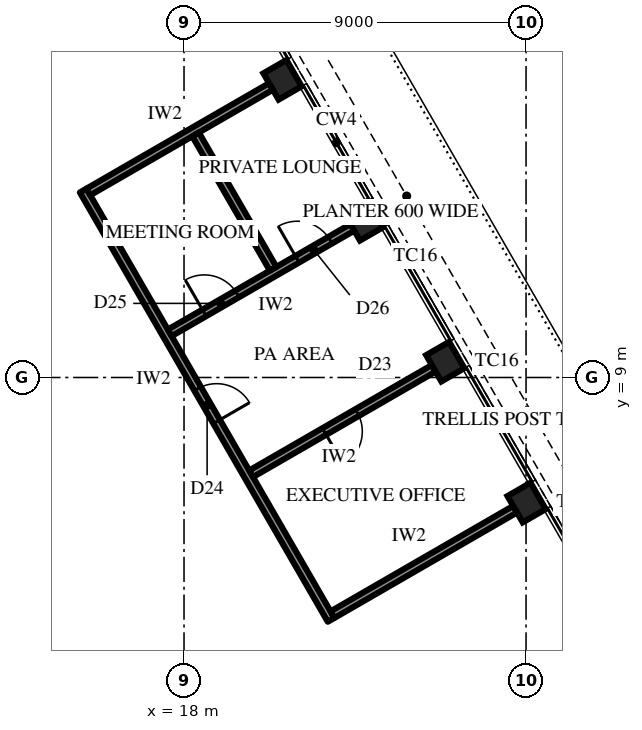
"""IFC4 building model, lengths in metres.
Left out: names, types, materials, properties, quantities, classifications, styles, units other than length and angle.
Written with IfcOpenShell. Run it as: python <this file> out.ifc"""

import sys

from ifc_helpers import new_model, si_unit, direction, frame, frame_2d, origin, origin_2d, place, context, subcontext, project, spatial, rectangle, extrude, element, fill, save


model = new_model("IFC4")
c1 = context("Model", 3, precision=1e-05, world=origin(), true_north=direction((0.0, 1.0)))
c2 = subcontext(c1, "Body", "Model", "MODEL_VIEW")
j1 = project(units=[si_unit("LENGTHUNIT", "METRE"), si_unit("PLANEANGLEUNIT", "RADIAN")], contexts=[c1])
p1 = place(None, origin())
s1 = spatial("IfcSite", under=j1, at=p1, CompositionType="ELEMENT")
p2 = place(p1, origin())
s2 = spatial("IfcBuilding", under=s1, at=p2, CompositionType="ELEMENT")
p3 = place(p2, frame((0.0, 0.0, 374.5)))
s3 = spatial("IfcBuildingStorey", under=s2, at=p3, CompositionType="ELEMENT", Elevation=374.5)
for number, where, z_axis, x_axis in (
    (1, (27.015, 5.708, 0.0), (0.0, 0.0, 1.0), (-0.5, 0.866, 0.0)),
    (2, (24.874, 9.417, 0.0), (0.0, 0.0, 1.0), (-0.5, 0.866, 0.0)),
    (3, (22.733, 13.125, 0.0), (0.0, 0.0, 1.0), (-0.5, 0.866, 0.0)),
    (4, (20.592, 16.833, 0.0), (0.0, 0.0, 1.0), (-0.5, 0.866, 0.0)),
):
    element("IfcColumn", number, at=place(p3, frame(where, z_axis=z_axis, x_axis=x_axis)), inside=s3, PredefinedType="COLUMN", context=c2, shape_type="SweptSolid", body=[
        extrude(rectangle(XDim=0.8, YDim=0.7, at=origin_2d()), origin(), (0.0, 0.0, 1.0), 4.2),
    ])
p4 = place(p3, frame((21.869, 2.622, 0.0), z_axis=(0.0, 0.0, 1.0), x_axis=(-0.500013496215, 0.866017611601, 0.0)))
e5 = element("IfcWall", 5, at=p4, inside=s3, PredefinedType="PARTITIONING", context=c2, shape_type="SweptSolid", body=[
    extrude(rectangle(XDim=13.046, YDim=0.2, at=frame_2d((6.523, 0.0))), origin(), (0.0, 0.0, 1.0), 4.0),
])
p5 = place(p4, frame((6.023, 0.0, 0.0)))
e6 = element("IfcOpeningElement", 6, at=p5, cuts=e5, PredefinedType="OPENING", context=c2, shape_type="SweptSolid", body=[
    extrude(rectangle(XDim=1.0, YDim=2.2, at=frame_2d((0.5, 1.1))), frame((0.0, 0.11, 0.0), z_axis=(0.0, -1.0, 0.0), x_axis=(1.0, 0.0, 0.0)), (0.0, 0.0, 1.0), 0.22),
])
p6 = place(p3, frame((21.906, 2.758, 0.0), z_axis=(0.0, 0.0, 1.0), x_axis=(0.866022967649, 0.500004219487, 0.0)))
e7 = element("IfcWall", 7, at=p6, inside=s3, PredefinedType="PARTITIONING", context=c2, shape_type="SweptSolid", body=[
    extrude(rectangle(XDim=5.55, YDim=0.2, at=frame_2d((2.775, 0.0))), origin(), (0.0, 0.0, 1.0), 3.082),
])
p7 = place(p3, frame((19.765, 6.467, 0.0), z_axis=(0.0, 0.0, 1.0), x_axis=(0.866011969997, 0.500023267281, 0.0)))
e8 = element("IfcWall", 8, at=p7, inside=s3, PredefinedType="PARTITIONING", context=c2, shape_type="SweptSolid", body=[
    extrude(rectangle(XDim=5.55, YDim=0.2, at=frame_2d((2.775, 0.0))), origin(), (0.0, 0.0, 1.0), 2.992),
])
p8 = place(p7, frame((2.225, 0.0, 0.0)))
e9 = element("IfcOpeningElement", 9, at=p8, cuts=e8, PredefinedType="OPENING", context=c2, shape_type="SweptSolid", body=[
    extrude(rectangle(XDim=1.0, YDim=2.2, at=frame_2d((0.5, 1.1))), frame((0.0, 0.11, 0.0), z_axis=(0.0, -1.0, 0.0), x_axis=(1.0, 0.0, 0.0)), (0.0, 0.0, 1.0), 0.22),
])
p9 = place(p3, frame((17.624, 10.175, 0.0), z_axis=(0.0, 0.0, 1.0), x_axis=(0.866042014628, 0.499971228071, 0.0)))
e10 = element("IfcWall", 10, at=p9, inside=s3, PredefinedType="PARTITIONING", context=c2, shape_type="SweptSolid", body=[
    extrude(rectangle(XDim=5.55, YDim=0.2, at=frame_2d((2.775, 0.0))), origin(), (0.0, 0.0, 1.0), 3.082),
])
p10 = place(p9, frame((1.05, 0.0, 0.0)))
e11 = element("IfcOpeningElement", 11, at=p10, cuts=e10, PredefinedType="OPENING", context=c2, shape_type="SweptSolid", body=[
    extrude(rectangle(XDim=1.0, YDim=2.2, at=frame_2d((0.5, 1.1))), frame((0.0, 0.11, 0.0), z_axis=(0.0, -1.0, 0.0), x_axis=(1.0, 0.0, 0.0)), (0.0, 0.0, 1.0), 0.22),
])
p11 = place(p9, frame((3.875, 0.0, 0.0)))
e12 = element("IfcOpeningElement", 12, at=p11, cuts=e10, PredefinedType="OPENING", context=c2, shape_type="SweptSolid", body=[
    extrude(rectangle(XDim=1.0, YDim=2.2, at=frame_2d((0.5, 1.1))), frame((0.0, 0.11, 0.0), z_axis=(0.0, -1.0, 0.0), x_axis=(1.0, 0.0, 0.0)), (0.0, 0.0, 1.0), 0.22),
])
p12 = place(p3, frame((15.483, 13.883, 0.0), z_axis=(0.0, 0.0, 1.0), x_axis=(0.866011969997, 0.500023267281, 0.0)))
e13 = element("IfcWall", 13, at=p12, inside=s3, PredefinedType="PARTITIONING", context=c2, shape_type="SweptSolid", body=[
    extrude(rectangle(XDim=5.55, YDim=0.2, at=frame_2d((2.775, 0.0))), origin(), (0.0, 0.0, 1.0), 3.082),
])
p13 = place(p3, frame((20.345, 11.862, 0.0), z_axis=(0.0, 0.0, 1.0), x_axis=(-0.499998569178, 0.866026229868, 0.0)))
e14 = element("IfcWall", 14, at=p13, inside=s3, PredefinedType="PARTITIONING", context=c2, shape_type="SweptSolid", body=[
    extrude(rectangle(XDim=4.082, YDim=0.2, at=frame_2d((2.041, 0.0))), origin(), (0.0, 0.0, 1.0), 4.0),
])
p14 = place(p8, frame((1.0, 0.0, 0.0), z_axis=(0.0, 0.0, 1.0), x_axis=(-1.0, 0.0, 0.0)))
e15 = element("IfcDoor", 15, at=p14, inside=s3, OperationType="SINGLE_SWING_LEFT", PredefinedType="DOOR", context=c2, shape_type="SweptSolid", body=[
    extrude(rectangle(XDim=1.0, YDim=2.2, at=frame_2d((0.5, 1.1))), frame((0.0, 0.025, 0.0), z_axis=(0.0, -1.0, 0.0), x_axis=(1.0, 0.0, 0.0)), (0.0, 0.0, 1.0), 0.05),
])
fill(e9, e15)
p15 = place(p5, frame((1.0, 0.0, 0.0), z_axis=(0.0, 0.0, 1.0), x_axis=(-1.0, 0.0, 0.0)))
e16 = element("IfcDoor", 16, at=p15, inside=s3, OperationType="SINGLE_SWING_LEFT", PredefinedType="DOOR", context=c2, shape_type="SweptSolid", body=[
    extrude(rectangle(XDim=1.0, YDim=2.2, at=frame_2d((0.5, 1.1))), frame((0.0, 0.025, 0.0), z_axis=(0.0, -1.0, 0.0), x_axis=(1.0, 0.0, 0.0)), (0.0, 0.0, 1.0), 0.05),
])
fill(e6, e16)
p16 = place(p10, origin())
e17 = element("IfcDoor", 17, at=p16, inside=s3, OperationType="SINGLE_SWING_RIGHT", PredefinedType="DOOR", context=c2, shape_type="SweptSolid", body=[
    extrude(rectangle(XDim=1.0, YDim=2.2, at=frame_2d((0.5, 1.1))), frame((0.0, 0.025, 0.0), z_axis=(0.0, -1.0, 0.0), x_axis=(1.0, 0.0, 0.0)), (0.0, 0.0, 1.0), 0.05),
])
fill(e11, e17)
p17 = place(p11, origin())
e18 = element("IfcDoor", 18, at=p17, inside=s3, OperationType="SINGLE_SWING_RIGHT", PredefinedType="DOOR", context=c2, shape_type="SweptSolid", body=[
    extrude(rectangle(XDim=1.0, YDim=2.2, at=frame_2d((0.5, 1.1))), frame((0.0, 0.025, 0.0), z_axis=(0.0, -1.0, 0.0), x_axis=(1.0, 0.0, 0.0)), (0.0, 0.0, 1.0), 0.05),
])
fill(e12, e18)
save(model, sys.argv[1])
